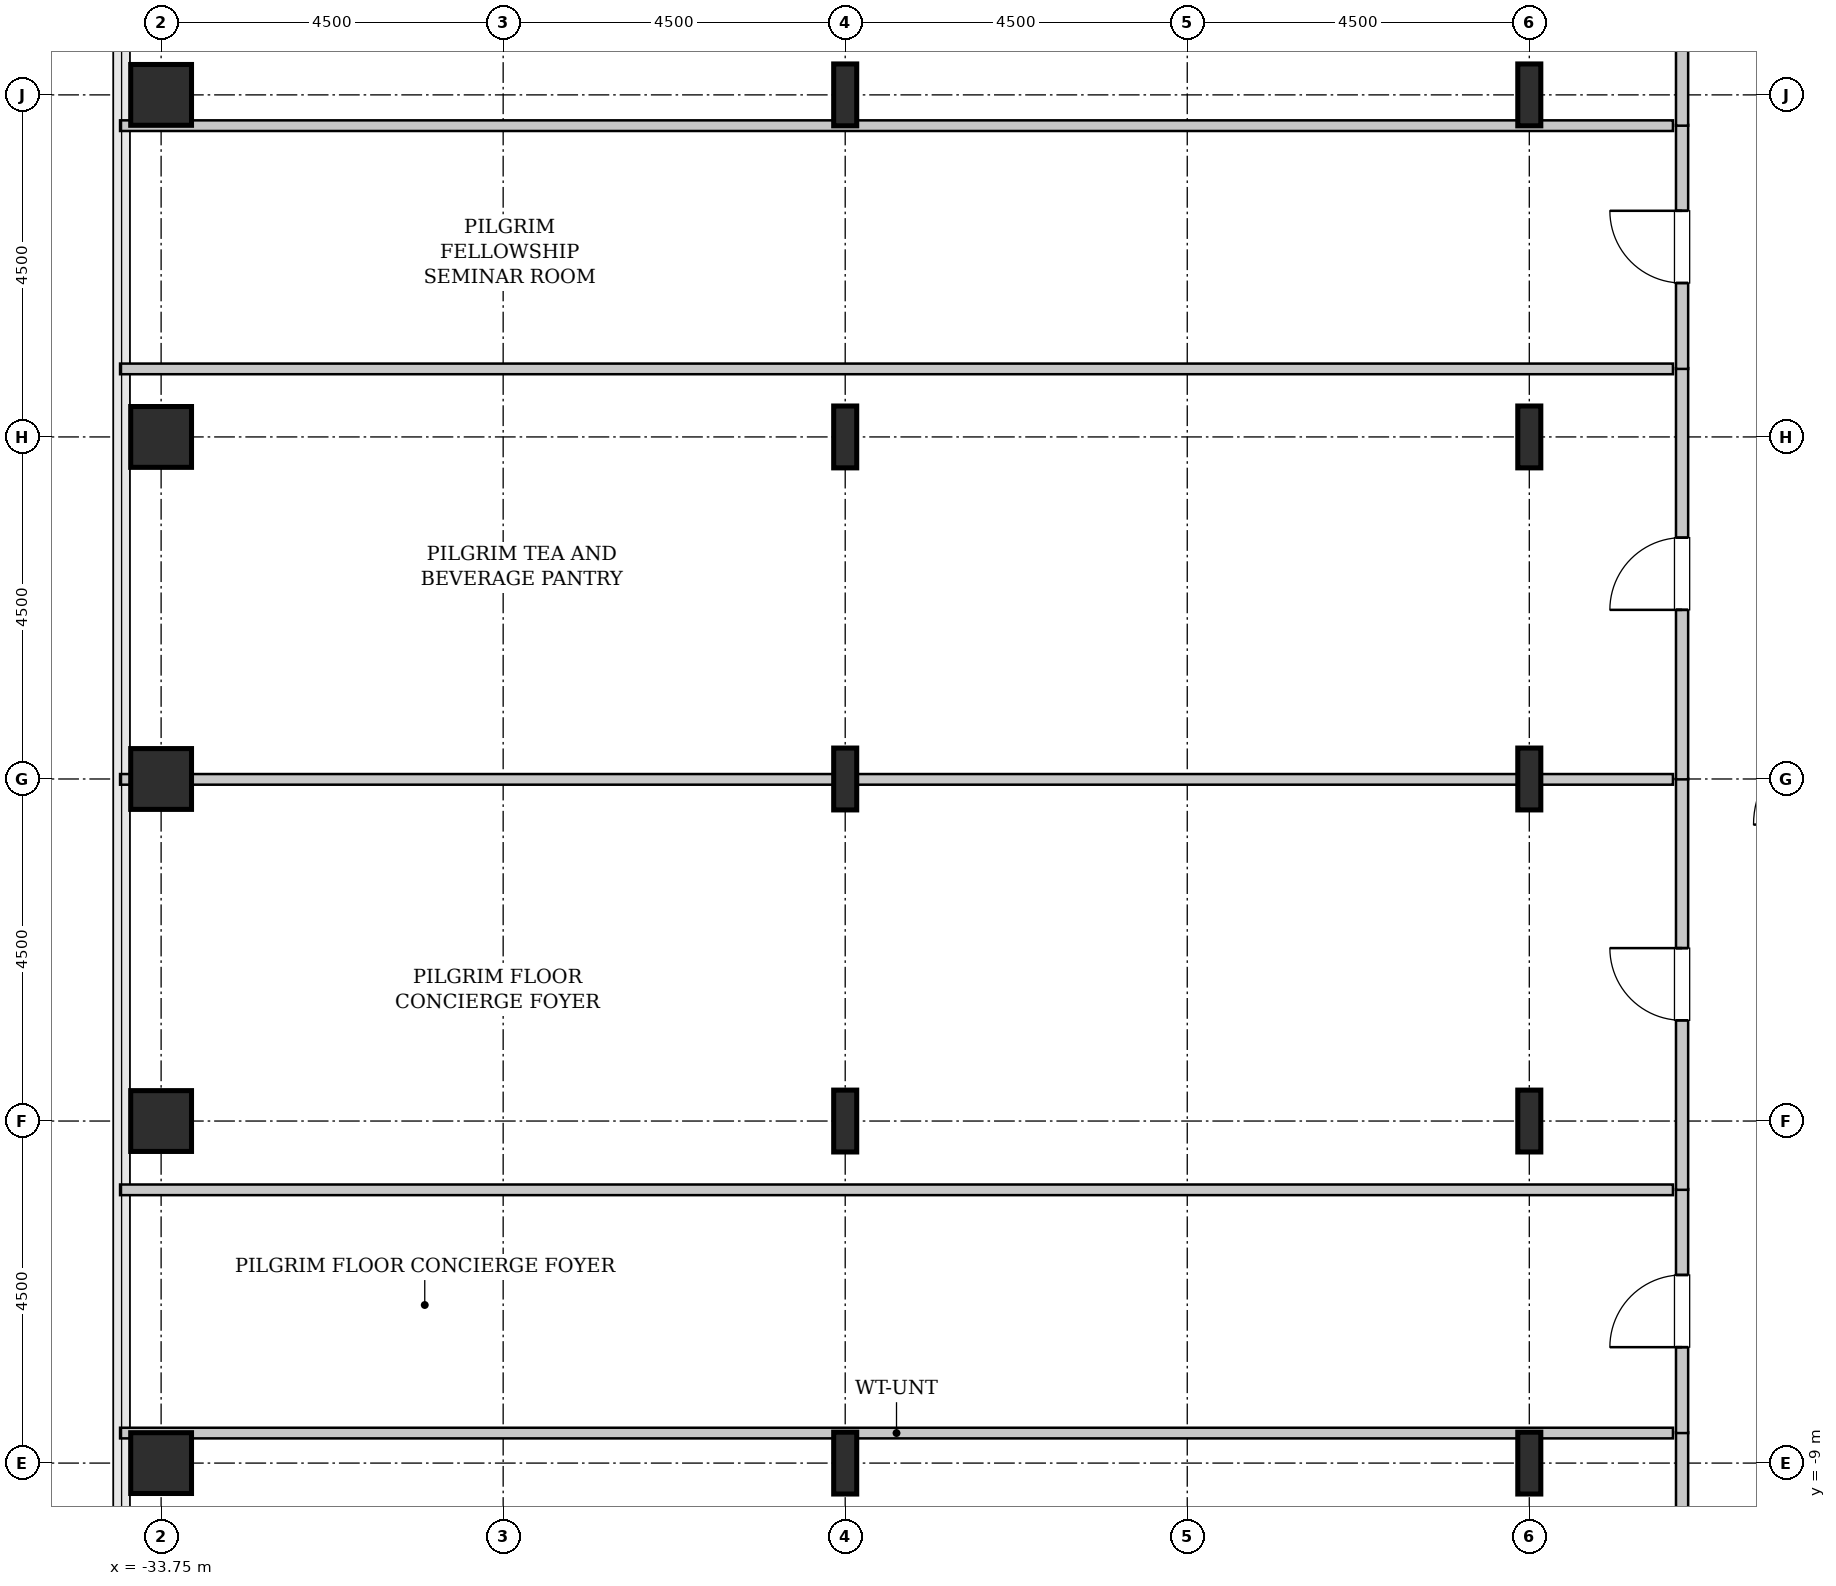
"""IFC4 building model, lengths in metres.
Left out: names, types, materials, properties, quantities, classifications, styles, units other than length and angle.
Written with IfcOpenShell. Run it as: python <this file> out.ifc"""

import sys

from ifc_helpers import new_model, si_unit, direction, frame, frame_2d, origin, origin_2d, place, context, subcontext, project, spatial, rectangle, hollow_rectangle, i_section, extrude, source, transform, mapped, element, fill, save


model = new_model("IFC4")
c1 = context("Model", 3, precision=1e-05, world=origin(), true_north=direction((0.0, 1.0)))
c2 = subcontext(c1, "Body", "Model", "MODEL_VIEW")
j1 = project(units=[si_unit("LENGTHUNIT", "METRE"), si_unit("PLANEANGLEUNIT", "RADIAN")], contexts=[c1])
p1 = place(None, origin())
s1 = spatial("IfcSite", under=j1, at=p1, CompositionType="ELEMENT")
p2 = place(p1, origin())
s2 = spatial("IfcBuilding", under=s1, at=p2, CompositionType="ELEMENT")
p3 = place(p2, frame((0.0, 0.0, 190.6)))
s3 = spatial("IfcBuildingStorey", under=s2, at=p3, CompositionType="ELEMENT", Elevation=190.6)
m1 = source(origin(), c2, "Body", "SweptSolid", [
    extrude(hollow_rectangle(XDim=0.8, YDim=0.8, WallThickness=0.04, InnerFilletRadius=0.04, OuterFilletRadius=0.08, at=origin_2d()), origin(), (0.0, 0.0, 1.0), 3.8),
])
for number, where, z_axis, x_axis in (
    (1, (-33.75, -9.0, 0.0), (0.0, 0.0, 1.0), (1.0, 0.0, 0.0)),
    (2, (-33.75, -4.5, 0.0), (0.0, 0.0, 1.0), (1.0, 0.0, 0.0)),
    (3, (-33.75, 0.0, 0.0), (0.0, 0.0, 1.0), (1.0, 0.0, 0.0)),
    (4, (-33.75, 4.5, 0.0), (0.0, 0.0, 1.0), (1.0, 0.0, 0.0)),
    (5, (-33.75, 9.0, 0.0), (0.0, 0.0, 1.0), (1.0, 0.0, 0.0)),
):
    element("IfcColumn", number, at=place(p3, frame(where, z_axis=z_axis, x_axis=x_axis)), inside=s3, PredefinedType="COLUMN", context=c2, shape_type="MappedRepresentation", body=[
        mapped(m1, transform((0.0, 0.0, 0.0), x_axis=(1.0, 0.0, 0.0), y_axis=(0.0, 1.0, 0.0), z_axis=(0.0, 0.0, 1.0), scale=1.0)),
    ])
m2 = source(origin(), c2, "Body", "SweptSolid", [
    extrude(i_section(OverallWidth=0.303, OverallDepth=0.814, WebThickness=0.021, FlangeThickness=0.04, FilletRadius=0.03, at=origin_2d()), origin(), (0.0, 0.0, 1.0), 3.8),
])
for number, where, z_axis, x_axis in (
    (6, (-24.75, -9.0, 0.0), (0.0, 0.0, 1.0), (1.0, 0.0, 0.0)),
    (7, (-24.75, -4.5, 0.0), (0.0, 0.0, 1.0), (1.0, 0.0, 0.0)),
    (8, (-24.75, 0.0, 0.0), (0.0, 0.0, 1.0), (1.0, 0.0, 0.0)),
    (9, (-24.75, 4.5, 0.0), (0.0, 0.0, 1.0), (1.0, 0.0, 0.0)),
    (10, (-24.75, 9.0, 0.0), (0.0, 0.0, 1.0), (1.0, 0.0, 0.0)),
    (11, (-15.75, -9.0, 0.0), (0.0, 0.0, 1.0), (1.0, 0.0, 0.0)),
    (12, (-15.75, -4.5, 0.0), (0.0, 0.0, 1.0), (1.0, 0.0, 0.0)),
    (13, (-15.75, 0.0, 0.0), (0.0, 0.0, 1.0), (1.0, 0.0, 0.0)),
    (14, (-15.75, 4.5, 0.0), (0.0, 0.0, 1.0), (1.0, 0.0, 0.0)),
    (15, (-15.75, 9.0, 0.0), (0.0, 0.0, 1.0), (1.0, 0.0, 0.0)),
):
    element("IfcColumn", number, at=place(p3, frame(where, z_axis=z_axis, x_axis=x_axis)), inside=s3, PredefinedType="COLUMN", context=c2, shape_type="MappedRepresentation", body=[
        mapped(m2, transform((0.0, 0.0, 0.0), x_axis=(1.0, 0.0, 0.0), y_axis=(0.0, 1.0, 0.0), z_axis=(0.0, 0.0, 1.0), scale=1.0)),
    ])
m3 = source(origin(), c2, "Body", "SweptSolid", [
    extrude(rectangle(XDim=12.645, YDim=0.16, at=frame_2d((6.323, 0.0))), origin(), (0.0, 0.0, 1.0), 3.535),
])
p4 = place(p3, frame((-13.74, -21.24, 0.0), z_axis=(0.0, 0.0, 1.0), x_axis=(0.0, 1.0, 0.0)))
e16 = element("IfcWall", 16, at=p4, inside=s3, PredefinedType="PARTITIONING", context=c2, shape_type="MappedRepresentation", body=[
    mapped(m3, transform((0.0, 0.0, 0.0), x_axis=(1.0, 0.0, 0.0), y_axis=(0.0, 1.0, 0.0), z_axis=(0.0, 0.0, 1.0), scale=1.0)),
])
p5 = place(p4, frame((7.762, 0.0, 0.0)))
e17 = element("IfcOpeningElement", 17, at=p5, cuts=e16, PredefinedType="OPENING", context=c2, shape_type="SweptSolid", body=[
    extrude(rectangle(XDim=0.95, YDim=2.1, at=frame_2d((0.475, 1.05))), frame((0.0, 0.09, 0.0), z_axis=(0.0, -1.0, 0.0), x_axis=(1.0, 0.0, 0.0)), (0.0, 0.0, 1.0), 0.18),
])
m4 = source(origin(), c2, "Body", "SweptSolid", [
    extrude(rectangle(XDim=20.43, YDim=0.14, at=frame_2d((10.215, 0.0))), origin(), (0.0, 0.0, 1.0), 2.875),
])
p6 = place(p3, frame((-34.29, -8.605, 0.0), z_axis=(0.0, 0.0, 1.0), x_axis=(1.0, 0.0, 0.0)))
e18 = element("IfcWall", 18, at=p6, inside=s3, PredefinedType="PARTITIONING", context=c2, shape_type="MappedRepresentation", body=[
    mapped(m4, transform((0.0, 0.0, 0.0), x_axis=(1.0, 0.0, 0.0), y_axis=(0.0, 1.0, 0.0), z_axis=(0.0, 0.0, 1.0), scale=1.0)),
])
m5 = source(origin(), c2, "Body", "SweptSolid", [
    extrude(rectangle(XDim=3.21, YDim=0.16, at=frame_2d((1.605, 0.0))), origin(), (0.0, 0.0, 1.0), 3.535),
])
p7 = place(p3, frame((-13.74, -8.605, 0.0), z_axis=(0.0, 0.0, 1.0), x_axis=(0.0, 1.0, 0.0)))
e19 = element("IfcWall", 19, at=p7, inside=s3, PredefinedType="PARTITIONING", context=c2, shape_type="MappedRepresentation", body=[
    mapped(m5, transform((0.0, 0.0, 0.0), x_axis=(1.0, 0.0, 0.0), y_axis=(0.0, 1.0, 0.0), z_axis=(0.0, 0.0, 1.0), scale=1.0)),
])
p8 = place(p7, frame((1.13, 0.0, 0.0)))
e20 = element("IfcOpeningElement", 20, at=p8, cuts=e19, PredefinedType="OPENING", context=c2, shape_type="SweptSolid", body=[
    extrude(rectangle(XDim=0.95, YDim=2.1, at=frame_2d((0.475, 1.05))), frame((0.0, 0.09, 0.0), z_axis=(0.0, -1.0, 0.0), x_axis=(1.0, 0.0, 0.0)), (0.0, 0.0, 1.0), 0.18),
])
m6 = source(origin(), c2, "Body", "SweptSolid", [
    extrude(rectangle(XDim=20.43, YDim=0.14, at=frame_2d((10.215, 0.0))), origin(), (0.0, 0.0, 1.0), 3.535),
])
p9 = place(p3, frame((-34.29, -5.405, 0.0), z_axis=(0.0, 0.0, 1.0), x_axis=(1.0, 0.0, 0.0)))
e21 = element("IfcWall", 21, at=p9, inside=s3, PredefinedType="PARTITIONING", context=c2, shape_type="MappedRepresentation", body=[
    mapped(m6, transform((0.0, 0.0, 0.0), x_axis=(1.0, 0.0, 0.0), y_axis=(0.0, 1.0, 0.0), z_axis=(0.0, 0.0, 1.0), scale=1.0)),
])
m7 = source(origin(), c2, "Body", "SweptSolid", [
    extrude(rectangle(XDim=5.41, YDim=0.16, at=frame_2d((2.705, 0.0))), origin(), (0.0, 0.0, 1.0), 3.535),
])
p10 = place(p3, frame((-13.74, -5.405, 0.0), z_axis=(0.0, 0.0, 1.0), x_axis=(0.0, 1.0, 0.0)))
e22 = element("IfcWall", 22, at=p10, inside=s3, PredefinedType="PARTITIONING", context=c2, shape_type="MappedRepresentation", body=[
    mapped(m7, transform((0.0, 0.0, 0.0), x_axis=(1.0, 0.0, 0.0), y_axis=(0.0, 1.0, 0.0), z_axis=(0.0, 0.0, 1.0), scale=1.0)),
])
p11 = place(p10, frame((2.23, 0.0, 0.0)))
e23 = element("IfcOpeningElement", 23, at=p11, cuts=e22, PredefinedType="OPENING", context=c2, shape_type="SweptSolid", body=[
    extrude(rectangle(XDim=0.95, YDim=2.1, at=frame_2d((0.475, 1.05))), frame((0.0, 0.09, 0.0), z_axis=(0.0, -1.0, 0.0), x_axis=(1.0, 0.0, 0.0)), (0.0, 0.0, 1.0), 0.18),
])
p12 = place(p3, frame((-34.29, -0.005, 0.0), z_axis=(0.0, 0.0, 1.0), x_axis=(1.0, 0.0, 0.0)))
e24 = element("IfcWall", 24, at=p12, inside=s3, PredefinedType="PARTITIONING", context=c2, shape_type="MappedRepresentation", body=[
    mapped(m4, transform((0.0, 0.0, 0.0), x_axis=(1.0, 0.0, 0.0), y_axis=(0.0, 1.0, 0.0), z_axis=(0.0, 0.0, 1.0), scale=1.0)),
])
p13 = place(p3, frame((-13.74, -0.005, 0.0), z_axis=(0.0, 0.0, 1.0), x_axis=(0.0, 1.0, 0.0)))
e25 = element("IfcWall", 25, at=p13, inside=s3, PredefinedType="PARTITIONING", context=c2, shape_type="MappedRepresentation", body=[
    mapped(m7, transform((0.0, 0.0, 0.0), x_axis=(1.0, 0.0, 0.0), y_axis=(0.0, 1.0, 0.0), z_axis=(0.0, 0.0, 1.0), scale=1.0)),
])
p14 = place(p13, frame((2.23, 0.0, 0.0)))
e26 = element("IfcOpeningElement", 26, at=p14, cuts=e25, PredefinedType="OPENING", context=c2, shape_type="SweptSolid", body=[
    extrude(rectangle(XDim=0.95, YDim=2.1, at=frame_2d((0.475, 1.05))), frame((0.0, 0.09, 0.0), z_axis=(0.0, -1.0, 0.0), x_axis=(1.0, 0.0, 0.0)), (0.0, 0.0, 1.0), 0.18),
])
p15 = place(p3, frame((-34.29, 5.395, 0.0), z_axis=(0.0, 0.0, 1.0), x_axis=(1.0, 0.0, 0.0)))
e27 = element("IfcWall", 27, at=p15, inside=s3, PredefinedType="PARTITIONING", context=c2, shape_type="MappedRepresentation", body=[
    mapped(m6, transform((0.0, 0.0, 0.0), x_axis=(1.0, 0.0, 0.0), y_axis=(0.0, 1.0, 0.0), z_axis=(0.0, 0.0, 1.0), scale=1.0)),
])
p16 = place(p3, frame((-13.74, 5.395, 0.0), z_axis=(0.0, 0.0, 1.0), x_axis=(0.0, 1.0, 0.0)))
e28 = element("IfcWall", 28, at=p16, inside=s3, PredefinedType="PARTITIONING", context=c2, shape_type="MappedRepresentation", body=[
    mapped(m5, transform((0.0, 0.0, 0.0), x_axis=(1.0, 0.0, 0.0), y_axis=(0.0, 1.0, 0.0), z_axis=(0.0, 0.0, 1.0), scale=1.0)),
])
p17 = place(p16, frame((1.13, 0.0, 0.0)))
e29 = element("IfcOpeningElement", 29, at=p17, cuts=e28, PredefinedType="OPENING", context=c2, shape_type="SweptSolid", body=[
    extrude(rectangle(XDim=0.95, YDim=2.1, at=frame_2d((0.475, 1.05))), frame((0.0, 0.09, 0.0), z_axis=(0.0, -1.0, 0.0), x_axis=(1.0, 0.0, 0.0)), (0.0, 0.0, 1.0), 0.18),
])
p18 = place(p3, frame((-34.29, 8.595, 0.0), z_axis=(0.0, 0.0, 1.0), x_axis=(1.0, 0.0, 0.0)))
e30 = element("IfcWall", 30, at=p18, inside=s3, PredefinedType="PARTITIONING", context=c2, shape_type="MappedRepresentation", body=[
    mapped(m4, transform((0.0, 0.0, 0.0), x_axis=(1.0, 0.0, 0.0), y_axis=(0.0, 1.0, 0.0), z_axis=(0.0, 0.0, 1.0), scale=1.0)),
])
p19 = place(p3, frame((-13.74, 8.595, 0.0), z_axis=(0.0, 0.0, 1.0), x_axis=(0.0, 1.0, 0.0)))
e31 = element("IfcWall", 31, at=p19, inside=s3, PredefinedType="PARTITIONING", context=c2, shape_type="MappedRepresentation", body=[
    mapped(m3, transform((0.0, 0.0, 0.0), x_axis=(1.0, 0.0, 0.0), y_axis=(0.0, 1.0, 0.0), z_axis=(0.0, 0.0, 1.0), scale=1.0)),
])
p20 = place(p19, frame((3.933, 0.0, 0.0)))
e32 = element("IfcOpeningElement", 32, at=p20, cuts=e31, PredefinedType="OPENING", context=c2, shape_type="SweptSolid", body=[
    extrude(rectangle(XDim=0.95, YDim=2.1, at=frame_2d((0.475, 1.05))), frame((0.0, 0.09, 0.0), z_axis=(0.0, -1.0, 0.0), x_axis=(1.0, 0.0, 0.0)), (0.0, 0.0, 1.0), 0.18),
])
m8 = source(origin(), c2, "Body", "SweptSolid", [
    extrude(rectangle(XDim=0.95, YDim=2.1, at=frame_2d((0.475, 1.05))), frame((0.0, 0.025, 0.0), z_axis=(0.0, -1.0, 0.0), x_axis=(1.0, 0.0, 0.0)), (0.0, 0.0, 1.0), 0.05),
])
p21 = place(p8, origin())
e33 = element("IfcDoor", 33, at=p21, inside=s3, OperationType="SINGLE_SWING_LEFT", PredefinedType="DOOR", context=c2, shape_type="MappedRepresentation", body=[
    mapped(m8, transform((0.0, 0.0, 0.0), x_axis=(1.0, 0.0, 0.0), y_axis=(0.0, 1.0, 0.0), z_axis=(0.0, 0.0, 1.0), scale=1.0)),
])
fill(e20, e33)
p22 = place(p11, origin())
e34 = element("IfcDoor", 34, at=p22, inside=s3, OperationType="SINGLE_SWING_RIGHT", PredefinedType="DOOR", context=c2, shape_type="MappedRepresentation", body=[
    mapped(m8, transform((0.0, 0.0, 0.0), x_axis=(1.0, 0.0, 0.0), y_axis=(0.0, 1.0, 0.0), z_axis=(0.0, 0.0, 1.0), scale=1.0)),
])
fill(e23, e34)
p23 = place(p14, origin())
e35 = element("IfcDoor", 35, at=p23, inside=s3, OperationType="SINGLE_SWING_LEFT", PredefinedType="DOOR", context=c2, shape_type="MappedRepresentation", body=[
    mapped(m8, transform((0.0, 0.0, 0.0), x_axis=(1.0, 0.0, 0.0), y_axis=(0.0, 1.0, 0.0), z_axis=(0.0, 0.0, 1.0), scale=1.0)),
])
fill(e26, e35)
p24 = place(p17, origin())
e36 = element("IfcDoor", 36, at=p24, inside=s3, OperationType="SINGLE_SWING_RIGHT", PredefinedType="DOOR", context=c2, shape_type="MappedRepresentation", body=[
    mapped(m8, transform((0.0, 0.0, 0.0), x_axis=(1.0, 0.0, 0.0), y_axis=(0.0, 1.0, 0.0), z_axis=(0.0, 0.0, 1.0), scale=1.0)),
])
fill(e29, e36)
save(model, sys.argv[1])
